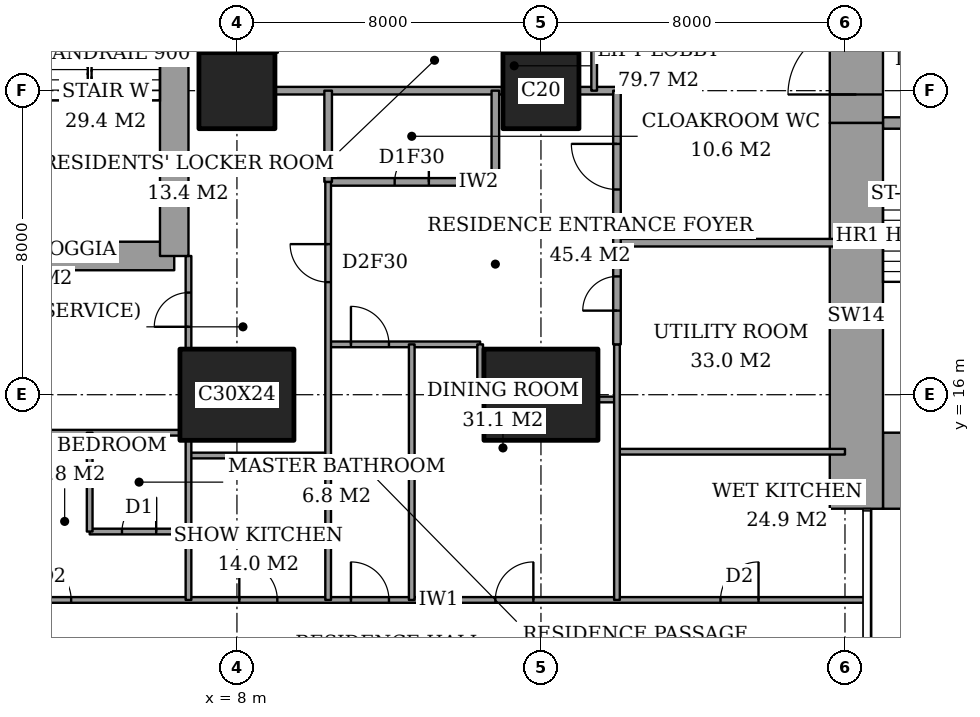
"""IFC4 building model, lengths in metres.
Left out: names, types, materials, properties, quantities, classifications, styles, units other than length and angle.
Written with IfcOpenShell. Run it as: python <this file> out.ifc"""

import sys

from ifc_helpers import new_model, si_unit, direction, frame, frame_2d, origin, origin_2d, place, context, subcontext, project, spatial, rectangle, extrude, element, fill, save


model = new_model("IFC4")
c1 = context("Model", 3, precision=1e-05, world=origin(), true_north=direction((0.0, 1.0)))
c2 = subcontext(c1, "Body", "Model", "MODEL_VIEW")
j1 = project(units=[si_unit("LENGTHUNIT", "METRE"), si_unit("PLANEANGLEUNIT", "RADIAN")], contexts=[c1])
p1 = place(None, origin())
s1 = spatial("IfcSite", under=j1, at=p1, CompositionType="ELEMENT")
p2 = place(p1, origin())
s2 = spatial("IfcBuilding", under=s1, at=p2, CompositionType="ELEMENT")
p3 = place(p2, frame((0.0, 0.0, 29.6)))
s3 = spatial("IfcBuildingStorey", under=s2, at=p3, CompositionType="ELEMENT", Elevation=29.6)
p4 = place(p3, frame((8.0, 16.0, 0.0), z_axis=(0.0, 0.0, 1.0), x_axis=(1.0, 0.0, 0.0)))
e1 = element("IfcColumn", 1, at=p4, inside=s3, PredefinedType="COLUMN", context=c2, shape_type="SweptSolid", body=[
    extrude(rectangle(XDim=3.0, YDim=2.4, at=origin_2d()), origin(), (0.0, 0.0, 1.0), 3.6),
])
p5 = place(p3, frame((8.0, 24.0, 0.0), z_axis=(0.0, 0.0, 1.0), x_axis=(1.0, 0.0, 0.0)))
e2 = element("IfcColumn", 2, at=p5, inside=s3, PredefinedType="COLUMN", context=c2, shape_type="SweptSolid", body=[
    extrude(rectangle(XDim=2.0, YDim=2.0, at=origin_2d()), origin(), (0.0, 0.0, 1.0), 3.6),
])
p6 = place(p3, frame((16.0, 16.0, 0.0), z_axis=(0.0, 0.0, 1.0), x_axis=(1.0, 0.0, 0.0)))
e3 = element("IfcColumn", 3, at=p6, inside=s3, PredefinedType="COLUMN", context=c2, shape_type="SweptSolid", body=[
    extrude(rectangle(XDim=3.0, YDim=2.4, at=origin_2d()), origin(), (0.0, 0.0, 1.0), 3.6),
])
p7 = place(p3, frame((16.0, 24.0, 0.0), z_axis=(0.0, 0.0, 1.0), x_axis=(1.0, 0.0, 0.0)))
e4 = element("IfcColumn", 4, at=p7, inside=s3, PredefinedType="COLUMN", context=c2, shape_type="SweptSolid", body=[
    extrude(rectangle(XDim=2.0, YDim=2.0, at=origin_2d()), origin(), (0.0, 0.0, 1.0), 3.6),
])
p8 = place(p3, frame((25.0, 14.0, 0.0), z_axis=(0.0, 0.0, 1.0), x_axis=(1.0, 0.0, 0.0)))
e5 = element("IfcWall", 5, at=p8, inside=s3, PredefinedType="SHEAR", context=c2, shape_type="SweptSolid", body=[
    extrude(rectangle(XDim=3.15, YDim=2.0, at=frame_2d((1.575, 0.0))), origin(), (0.0, 0.0, 1.0), 3.6),
])
p9 = place(p3, frame((24.3, 13.0, 0.0), z_axis=(0.0, 0.0, 1.0), x_axis=(0.0, 1.0, 0.0)))
e6 = element("IfcWall", 6, at=p9, inside=s3, PredefinedType="SHEAR", context=c2, shape_type="SweptSolid", body=[
    extrude(rectangle(XDim=10.15, YDim=1.4, at=frame_2d((5.075, 0.0))), origin(), (0.0, 0.0, 1.0), 3.6),
])
p10 = place(p3, frame((24.3, 23.15, 0.0), z_axis=(0.0, 0.0, 1.0), x_axis=(0.0, 1.0, 0.0)))
e7 = element("IfcWall", 7, at=p10, inside=s3, PredefinedType="SHEAR", context=c2, shape_type="SweptSolid", body=[
    extrude(rectangle(XDim=11.85, YDim=1.4, at=frame_2d((5.925, 0.0))), origin(), (0.0, 0.0, 1.0), 3.6),
])
p11 = place(p10, frame((0.75, 0.0, 0.0)))
e8 = element("IfcOpeningElement", 8, at=p11, cuts=e7, PredefinedType="OPENING", context=c2, shape_type="SweptSolid", body=[
    extrude(rectangle(XDim=1.8, YDim=2.4, at=frame_2d((0.9, 1.2))), frame((0.0, 0.71, 0.0), z_axis=(0.0, -1.0, 0.0), x_axis=(1.0, 0.0, 0.0)), (0.0, 0.0, 1.0), 1.42),
])
p12 = place(p3, frame((25.0, 23.15, 0.0), z_axis=(0.0, 0.0, 1.0), x_axis=(1.0, 0.0, 0.0)))
e9 = element("IfcWall", 9, at=p12, inside=s3, PredefinedType="SHEAR", context=c2, shape_type="SweptSolid", body=[
    extrude(rectangle(XDim=3.15, YDim=0.3, at=frame_2d((1.575, 0.0))), origin(), (0.0, 0.0, 1.0), 3.6),
])
p13 = place(p12, frame((0.6, 0.0, 0.0)))
e10 = element("IfcOpeningElement", 10, at=p13, cuts=e9, PredefinedType="OPENING", context=c2, shape_type="SweptSolid", body=[
    extrude(rectangle(XDim=1.0, YDim=2.1, at=frame_2d((0.5, 1.05))), frame((0.0, 0.16, 0.0), z_axis=(0.0, -1.0, 0.0), x_axis=(1.0, 0.0, 0.0)), (0.0, 0.0, 1.0), 0.32),
])
p14 = place(p3, frame((1.9, 19.65, 0.0), z_axis=(0.0, 0.0, 1.0), x_axis=(1.0, 0.0, 0.0)))
e11 = element("IfcWall", 11, at=p14, inside=s3, PredefinedType="SHEAR", context=c2, shape_type="SweptSolid", body=[
    extrude(rectangle(XDim=4.45, YDim=0.75, at=frame_2d((2.225, 0.0))), origin(), (0.0, 0.0, 1.0), 3.6),
])
p15 = place(p3, frame((6.35, 19.65, 0.0), z_axis=(0.0, 0.0, 1.0), x_axis=(0.0, 1.0, 0.0)))
e12 = element("IfcWall", 12, at=p15, inside=s3, PredefinedType="SHEAR", context=c2, shape_type="SweptSolid", body=[
    extrude(rectangle(XDim=8.7, YDim=0.75, at=frame_2d((4.35, 0.0))), origin(), (0.0, 0.0, 1.0), 3.6),
])
p16 = place(p15, frame((6.725, 0.0, 0.0)))
e13 = element("IfcOpeningElement", 13, at=p16, cuts=e12, PredefinedType="OPENING", context=c2, shape_type="SweptSolid", body=[
    extrude(rectangle(XDim=1.0, YDim=2.1, at=frame_2d((0.5, 1.05))), frame((0.0, 0.385, 0.0), z_axis=(0.0, -1.0, 0.0), x_axis=(1.0, 0.0, 0.0)), (0.0, 0.0, 1.0), 0.77),
])
p17 = place(p3, frame((-0.45, 10.6, 0.0), z_axis=(0.0, 0.0, 1.0), x_axis=(1.0, 0.0, 0.0)))
e14 = element("IfcWall", 14, at=p17, inside=s3, PredefinedType="PARTITIONING", context=c2, shape_type="SweptSolid", body=[
    extrude(rectangle(XDim=25.011, YDim=0.15, at=frame_2d((12.505, 0.0))), origin(), (0.0, 0.0, 1.0), 3.35),
])
p18 = place(p17, frame((11.45, 0.0, 0.0)))
e15 = element("IfcOpeningElement", 15, at=p18, cuts=e14, PredefinedType="OPENING", context=c2, shape_type="SweptSolid", body=[
    extrude(rectangle(XDim=1.0, YDim=2.1, at=frame_2d((0.5, 1.05))), frame((0.0, 0.085, 0.0), z_axis=(0.0, -1.0, 0.0), x_axis=(1.0, 0.0, 0.0)), (0.0, 0.0, 1.0), 0.17),
])
p19 = place(p17, frame((3.087, 0.0, 0.0)))
e16 = element("IfcOpeningElement", 16, at=p19, cuts=e14, PredefinedType="OPENING", context=c2, shape_type="SweptSolid", body=[
    extrude(rectangle(XDim=1.0, YDim=2.1, at=frame_2d((0.5, 1.05))), frame((0.0, 0.085, 0.0), z_axis=(0.0, -1.0, 0.0), x_axis=(1.0, 0.0, 0.0)), (0.0, 0.0, 1.0), 0.17),
])
p20 = place(p17, frame((8.512, 0.0, 0.0)))
e17 = element("IfcOpeningElement", 17, at=p20, cuts=e14, PredefinedType="OPENING", context=c2, shape_type="SweptSolid", body=[
    extrude(rectangle(XDim=1.0, YDim=2.1, at=frame_2d((0.5, 1.05))), frame((0.0, 0.085, 0.0), z_axis=(0.0, -1.0, 0.0), x_axis=(1.0, 0.0, 0.0)), (0.0, 0.0, 1.0), 0.17),
])
p21 = place(p17, frame((15.25, 0.0, 0.0)))
e18 = element("IfcOpeningElement", 18, at=p21, cuts=e14, PredefinedType="OPENING", context=c2, shape_type="SweptSolid", body=[
    extrude(rectangle(XDim=1.0, YDim=2.1, at=frame_2d((0.5, 1.05))), frame((0.0, 0.085, 0.0), z_axis=(0.0, -1.0, 0.0), x_axis=(1.0, 0.0, 0.0)), (0.0, 0.0, 1.0), 0.17),
])
p22 = place(p17, frame((21.175, 0.0, 0.0)))
e19 = element("IfcOpeningElement", 19, at=p22, cuts=e14, PredefinedType="OPENING", context=c2, shape_type="SweptSolid", body=[
    extrude(rectangle(XDim=1.0, YDim=2.1, at=frame_2d((0.5, 1.05))), frame((0.0, 0.085, 0.0), z_axis=(0.0, -1.0, 0.0), x_axis=(1.0, 0.0, 0.0)), (0.0, 0.0, 1.0), 0.17),
])
p23 = place(p3, frame((4.125, 12.4, 0.0), z_axis=(0.0, 0.0, 1.0), x_axis=(1.0, 0.0, 0.0)))
e20 = element("IfcWall", 20, at=p23, inside=s3, PredefinedType="PARTITIONING", context=c2, shape_type="SweptSolid", body=[
    extrude(rectangle(XDim=2.6, YDim=0.15, at=frame_2d((1.3, 0.0))), origin(), (0.0, 0.0, 1.0), 3.35),
])
p24 = place(p23, frame((0.85, 0.0, 0.0)))
e21 = element("IfcOpeningElement", 21, at=p24, cuts=e20, PredefinedType="OPENING", context=c2, shape_type="SweptSolid", body=[
    extrude(rectangle(XDim=0.9, YDim=2.1, at=frame_2d((0.45, 1.05))), frame((0.0, 0.085, 0.0), z_axis=(0.0, -1.0, 0.0), x_axis=(1.0, 0.0, 0.0)), (0.0, 0.0, 1.0), 0.17),
])
p25 = place(p3, frame((6.725, 14.4, 0.0), z_axis=(0.0, 0.0, 1.0), x_axis=(1.0, 0.0, 0.0)))
e22 = element("IfcWall", 22, at=p25, inside=s3, PredefinedType="PARTITIONING", context=c2, shape_type="SweptSolid", body=[
    extrude(rectangle(XDim=3.675, YDim=0.15, at=frame_2d((1.837, 0.0))), origin(), (0.0, 0.0, 1.0), 3.35),
])
p26 = place(p3, frame((18.0, 14.5, 0.0), z_axis=(0.0, 0.0, 1.0), x_axis=(1.0, 0.0, 0.0)))
e23 = element("IfcWall", 23, at=p26, inside=s3, PredefinedType="PARTITIONING", context=c2, shape_type="SweptSolid", body=[
    extrude(rectangle(XDim=6.0, YDim=0.15, at=frame_2d((3.0, 0.0))), origin(), (0.0, 0.0, 1.0), 3.35),
])
p27 = place(p3, frame((1.35, 15.0, 0.0), z_axis=(0.0, 0.0, 1.0), x_axis=(1.0, 0.0, 0.0)))
e24 = element("IfcWall", 24, at=p27, inside=s3, PredefinedType="PARTITIONING", context=c2, shape_type="SweptSolid", body=[
    extrude(rectangle(XDim=5.15, YDim=0.15, at=frame_2d((2.575, 0.0))), origin(), (0.0, 0.0, 1.0), 3.35),
])
p28 = place(p3, frame((17.5, 15.875, 0.0), z_axis=(0.0, 0.0, 1.0), x_axis=(1.0, 0.0, 0.0)))
e25 = element("IfcWall", 25, at=p28, inside=s3, PredefinedType="PARTITIONING", context=c2, shape_type="SweptSolid", body=[
    extrude(rectangle(XDim=0.5, YDim=0.15, at=frame_2d((0.25, 0.0))), origin(), (0.0, 0.0, 1.0), 2.634),
])
p29 = place(p3, frame((10.4, 17.325, 0.0), z_axis=(0.0, 0.0, 1.0), x_axis=(1.0, 0.0, 0.0)))
e26 = element("IfcWall", 26, at=p29, inside=s3, PredefinedType="PARTITIONING", context=c2, shape_type="SweptSolid", body=[
    extrude(rectangle(XDim=4.0, YDim=0.15, at=frame_2d((2.0, 0.0))), origin(), (0.0, 0.0, 1.0), 3.35),
])
p30 = place(p29, frame((0.6, 0.0, 0.0)))
e27 = element("IfcOpeningElement", 27, at=p30, cuts=e26, PredefinedType="OPENING", context=c2, shape_type="SweptSolid", body=[
    extrude(rectangle(XDim=1.0, YDim=2.1, at=frame_2d((0.5, 1.05))), frame((0.0, 0.085, 0.0), z_axis=(0.0, -1.0, 0.0), x_axis=(1.0, 0.0, 0.0)), (0.0, 0.0, 1.0), 0.17),
])
p31 = place(p3, frame((18.0, 20.0, 0.0), z_axis=(0.0, 0.0, 1.0), x_axis=(1.0, 0.0, 0.0)))
e28 = element("IfcWall", 28, at=p31, inside=s3, PredefinedType="PARTITIONING", context=c2, shape_type="SweptSolid", body=[
    extrude(rectangle(XDim=6.0, YDim=0.2, at=frame_2d((3.0, 0.0))), origin(), (0.0, 0.0, 1.0), 3.35),
])
p32 = place(p3, frame((10.4, 21.6, 0.0), z_axis=(0.0, 0.0, 1.0), x_axis=(1.0, 0.0, 0.0)))
e29 = element("IfcWall", 29, at=p32, inside=s3, PredefinedType="PARTITIONING", context=c2, shape_type="SweptSolid", body=[
    extrude(rectangle(XDim=4.4, YDim=0.2, at=frame_2d((2.2, 0.0))), origin(), (0.0, 0.0, 1.0), 3.35),
])
p33 = place(p32, frame((1.75, 0.0, 0.0)))
e30 = element("IfcOpeningElement", 30, at=p33, cuts=e29, PredefinedType="OPENING", context=c2, shape_type="SweptSolid", body=[
    extrude(rectangle(XDim=0.9, YDim=2.1, at=frame_2d((0.45, 1.05))), frame((0.0, 0.11, 0.0), z_axis=(0.0, -1.0, 0.0), x_axis=(1.0, 0.0, 0.0)), (0.0, 0.0, 1.0), 0.22),
])
p34 = place(p3, frame((9.0, 24.0, 0.0), z_axis=(0.0, 0.0, 1.0), x_axis=(1.0, 0.0, 0.0)))
e31 = element("IfcWall", 31, at=p34, inside=s3, PredefinedType="PARTITIONING", context=c2, shape_type="SweptSolid", body=[
    extrude(rectangle(XDim=6.0, YDim=0.2, at=frame_2d((3.0, 0.0))), origin(), (0.0, 0.0, 1.0), 3.35),
])
p35 = place(p3, frame((17.0, 24.0, 0.0), z_axis=(0.0, 0.0, 1.0), x_axis=(1.0, 0.0, 0.0)))
e32 = element("IfcWall", 32, at=p35, inside=s3, PredefinedType="PARTITIONING", context=c2, shape_type="SweptSolid", body=[
    extrude(rectangle(XDim=1.0, YDim=0.2, at=frame_2d((0.5, 0.0))), origin(), (0.0, 0.0, 1.0), 3.35),
])
p36 = place(p3, frame((4.125, 12.4, 0.0), z_axis=(0.0, 0.0, 1.0), x_axis=(0.0, 1.0, 0.0)))
e33 = element("IfcWall", 33, at=p36, inside=s3, PredefinedType="PARTITIONING", context=c2, shape_type="SweptSolid", body=[
    extrude(rectangle(XDim=2.6, YDim=0.15, at=frame_2d((1.3, 0.0))), origin(), (0.0, 0.0, 1.0), 3.35),
])
p37 = place(p3, frame((6.725, 10.6, 0.0), z_axis=(0.0, 0.0, 1.0), x_axis=(0.0, 1.0, 0.0)))
e34 = element("IfcWall", 34, at=p37, inside=s3, PredefinedType="PARTITIONING", context=c2, shape_type="SweptSolid", body=[
    extrude(rectangle(XDim=4.2, YDim=0.15, at=frame_2d((2.1, 0.0))), origin(), (0.0, 0.0, 1.0), 3.35),
])
p38 = place(p3, frame((6.725, 17.2, 0.0), z_axis=(0.0, 0.0, 1.0), x_axis=(0.0, 1.0, 0.0)))
e35 = element("IfcWall", 35, at=p38, inside=s3, PredefinedType="PARTITIONING", context=c2, shape_type="SweptSolid", body=[
    extrude(rectangle(XDim=2.45, YDim=0.15, at=frame_2d((1.225, 0.0))), origin(), (0.0, 0.0, 1.0), 3.35),
])
p39 = place(p38, frame((0.587, 0.0, 0.0)))
e36 = element("IfcOpeningElement", 36, at=p39, cuts=e35, PredefinedType="OPENING", context=c2, shape_type="SweptSolid", body=[
    extrude(rectangle(XDim=0.9, YDim=2.1, at=frame_2d((0.45, 1.05))), frame((0.0, 0.085, 0.0), z_axis=(0.0, -1.0, 0.0), x_axis=(1.0, 0.0, 0.0)), (0.0, 0.0, 1.0), 0.17),
])
p40 = place(p3, frame((10.4, 21.6, 0.0), z_axis=(0.0, 0.0, 1.0), x_axis=(0.0, 1.0, 0.0)))
e37 = element("IfcWall", 37, at=p40, inside=s3, PredefinedType="PARTITIONING", context=c2, shape_type="SweptSolid", body=[
    extrude(rectangle(XDim=2.4, YDim=0.2, at=frame_2d((1.2, 0.0))), origin(), (0.0, 0.0, 1.0), 3.35),
])
p41 = place(p3, frame((10.4, 10.6, 0.0), z_axis=(0.0, 0.0, 1.0), x_axis=(0.0, 1.0, 0.0)))
e38 = element("IfcWall", 38, at=p41, inside=s3, PredefinedType="PARTITIONING", context=c2, shape_type="SweptSolid", body=[
    extrude(rectangle(XDim=11.0, YDim=0.15, at=frame_2d((5.5, 0.0))), origin(), (0.0, 0.0, 1.0), 3.35),
])
p42 = place(p41, frame((8.363, 0.0, 0.0)))
e39 = element("IfcOpeningElement", 39, at=p42, cuts=e38, PredefinedType="OPENING", context=c2, shape_type="SweptSolid", body=[
    extrude(rectangle(XDim=1.0, YDim=2.1, at=frame_2d((0.5, 1.05))), frame((0.0, 0.085, 0.0), z_axis=(0.0, -1.0, 0.0), x_axis=(1.0, 0.0, 0.0)), (0.0, 0.0, 1.0), 0.17),
])
p43 = place(p3, frame((12.6, 10.6, 0.0), z_axis=(0.0, 0.0, 1.0), x_axis=(0.0, 1.0, 0.0)))
e40 = element("IfcWall", 40, at=p43, inside=s3, PredefinedType="PARTITIONING", context=c2, shape_type="SweptSolid", body=[
    extrude(rectangle(XDim=6.725, YDim=0.15, at=frame_2d((3.362, 0.0))), origin(), (0.0, 0.0, 1.0), 3.35),
])
p44 = place(p3, frame((14.4, 15.875, 0.0), z_axis=(0.0, 0.0, 1.0), x_axis=(0.0, 1.0, 0.0)))
e41 = element("IfcWall", 41, at=p44, inside=s3, PredefinedType="PARTITIONING", context=c2, shape_type="SweptSolid", body=[
    extrude(rectangle(XDim=1.45, YDim=0.15, at=frame_2d((0.725, 0.0))), origin(), (0.0, 0.0, 1.0), 3.35),
])
p45 = place(p3, frame((14.8, 21.6, 0.0), z_axis=(0.0, 0.0, 1.0), x_axis=(0.0, 1.0, 0.0)))
e42 = element("IfcWall", 42, at=p45, inside=s3, PredefinedType="PARTITIONING", context=c2, shape_type="SweptSolid", body=[
    extrude(rectangle(XDim=2.4, YDim=0.2, at=frame_2d((1.2, 0.0))), origin(), (0.0, 0.0, 1.0), 3.35),
])
p46 = place(p3, frame((17.4, 24.0, 0.0), z_axis=(0.0, 0.0, 1.0), x_axis=(0.0, 1.0, 0.0)))
e43 = element("IfcWall", 43, at=p46, inside=s3, PredefinedType="PARTITIONING", context=c2, shape_type="SweptSolid", body=[
    extrude(rectangle(XDim=1.6, YDim=0.15, at=frame_2d((0.8, 0.0))), origin(), (0.0, 0.0, 1.0), 3.35),
])
p47 = place(p3, frame((18.0, 17.325, 0.0), z_axis=(0.0, 0.0, 1.0), x_axis=(0.0, 1.0, 0.0)))
e44 = element("IfcWall", 44, at=p47, inside=s3, PredefinedType="PARTITIONING", context=c2, shape_type="SweptSolid", body=[
    extrude(rectangle(XDim=6.675, YDim=0.2, at=frame_2d((3.337, 0.0))), origin(), (0.0, 0.0, 1.0), 3.35),
])
p48 = place(p47, frame((4.075, 0.0, 0.0)))
e45 = element("IfcOpeningElement", 45, at=p48, cuts=e44, PredefinedType="OPENING", context=c2, shape_type="SweptSolid", body=[
    extrude(rectangle(XDim=1.2, YDim=2.4, at=frame_2d((0.6, 1.2))), frame((0.0, 0.11, 0.0), z_axis=(0.0, -1.0, 0.0), x_axis=(1.0, 0.0, 0.0)), (0.0, 0.0, 1.0), 0.22),
])
p49 = place(p47, frame((0.887, 0.0, 0.0)))
e46 = element("IfcOpeningElement", 46, at=p49, cuts=e44, PredefinedType="OPENING", context=c2, shape_type="SweptSolid", body=[
    extrude(rectangle(XDim=0.9, YDim=2.1, at=frame_2d((0.45, 1.05))), frame((0.0, 0.11, 0.0), z_axis=(0.0, -1.0, 0.0), x_axis=(1.0, 0.0, 0.0)), (0.0, 0.0, 1.0), 0.22),
])
p50 = place(p3, frame((18.0, 10.6, 0.0), z_axis=(0.0, 0.0, 1.0), x_axis=(0.0, 1.0, 0.0)))
e47 = element("IfcWall", 47, at=p50, inside=s3, PredefinedType="PARTITIONING", context=c2, shape_type="SweptSolid", body=[
    extrude(rectangle(XDim=6.725, YDim=0.15, at=frame_2d((3.362, 0.0))), origin(), (0.0, 0.0, 1.0), 3.35),
])
p51 = place(p18, origin())
e48 = element("IfcDoor", 48, at=p51, inside=s3, OperationType="SINGLE_SWING_RIGHT", PredefinedType="DOOR", context=c2, shape_type="SweptSolid", body=[
    extrude(rectangle(XDim=1.0, YDim=2.1, at=frame_2d((0.5, 1.05))), frame((0.0, 0.025, 0.0), z_axis=(0.0, -1.0, 0.0), x_axis=(1.0, 0.0, 0.0)), (0.0, 0.0, 1.0), 0.05),
])
fill(e15, e48)
p52 = place(p24, origin())
e49 = element("IfcDoor", 49, at=p52, inside=s3, OperationType="SINGLE_SWING_LEFT", PredefinedType="DOOR", context=c2, shape_type="SweptSolid", body=[
    extrude(rectangle(XDim=0.9, YDim=2.1, at=frame_2d((0.45, 1.05))), frame((0.0, 0.025, 0.0), z_axis=(0.0, -1.0, 0.0), x_axis=(1.0, 0.0, 0.0)), (0.0, 0.0, 1.0), 0.05),
])
fill(e21, e49)
p53 = place(p19, origin())
e50 = element("IfcDoor", 50, at=p53, inside=s3, OperationType="SINGLE_SWING_RIGHT", PredefinedType="DOOR", context=c2, shape_type="SweptSolid", body=[
    extrude(rectangle(XDim=1.0, YDim=2.1, at=frame_2d((0.5, 1.05))), frame((0.0, 0.025, 0.0), z_axis=(0.0, -1.0, 0.0), x_axis=(1.0, 0.0, 0.0)), (0.0, 0.0, 1.0), 0.05),
])
fill(e16, e50)
p54 = place(p39, origin())
e51 = element("IfcDoor", 51, at=p54, inside=s3, OperationType="SINGLE_SWING_RIGHT", PredefinedType="DOOR", context=c2, shape_type="SweptSolid", body=[
    extrude(rectangle(XDim=0.9, YDim=2.1, at=frame_2d((0.45, 1.05))), frame((0.0, 0.025, 0.0), z_axis=(0.0, -1.0, 0.0), x_axis=(1.0, 0.0, 0.0)), (0.0, 0.0, 1.0), 0.05),
])
fill(e36, e51)
p55 = place(p20, origin())
e52 = element("IfcDoor", 52, at=p55, inside=s3, OperationType="SINGLE_SWING_RIGHT", PredefinedType="DOOR", context=c2, shape_type="SweptSolid", body=[
    extrude(rectangle(XDim=1.0, YDim=2.1, at=frame_2d((0.5, 1.05))), frame((0.0, 0.025, 0.0), z_axis=(0.0, -1.0, 0.0), x_axis=(1.0, 0.0, 0.0)), (0.0, 0.0, 1.0), 0.05),
])
fill(e17, e52)
p56 = place(p42, origin())
e53 = element("IfcDoor", 53, at=p56, inside=s3, OperationType="SINGLE_SWING_LEFT", PredefinedType="DOOR", context=c2, shape_type="SweptSolid", body=[
    extrude(rectangle(XDim=1.0, YDim=2.1, at=frame_2d((0.5, 1.05))), frame((0.0, 0.025, 0.0), z_axis=(0.0, -1.0, 0.0), x_axis=(1.0, 0.0, 0.0)), (0.0, 0.0, 1.0), 0.05),
])
fill(e39, e53)
p57 = place(p33, origin())
e54 = element("IfcDoor", 54, at=p57, inside=s3, OperationType="SINGLE_SWING_LEFT", PredefinedType="DOOR", context=c2, shape_type="SweptSolid", body=[
    extrude(rectangle(XDim=0.9, YDim=2.1, at=frame_2d((0.45, 1.05))), frame((0.0, 0.025, 0.0), z_axis=(0.0, -1.0, 0.0), x_axis=(1.0, 0.0, 0.0)), (0.0, 0.0, 1.0), 0.05),
])
fill(e30, e54)
p58 = place(p48, origin())
e55 = element("IfcDoor", 55, at=p58, inside=s3, OperationType="SINGLE_SWING_LEFT", PredefinedType="DOOR", context=c2, shape_type="SweptSolid", body=[
    extrude(rectangle(XDim=1.2, YDim=2.4, at=frame_2d((0.6, 1.2))), frame((0.0, 0.025, 0.0), z_axis=(0.0, -1.0, 0.0), x_axis=(1.0, 0.0, 0.0)), (0.0, 0.0, 1.0), 0.05),
])
fill(e45, e55)
p59 = place(p30, origin())
e56 = element("IfcDoor", 56, at=p59, inside=s3, OperationType="SINGLE_SWING_RIGHT", PredefinedType="DOOR", context=c2, shape_type="SweptSolid", body=[
    extrude(rectangle(XDim=1.0, YDim=2.1, at=frame_2d((0.5, 1.05))), frame((0.0, 0.025, 0.0), z_axis=(0.0, -1.0, 0.0), x_axis=(1.0, 0.0, 0.0)), (0.0, 0.0, 1.0), 0.05),
])
fill(e27, e56)
p60 = place(p21, origin())
e57 = element("IfcDoor", 57, at=p60, inside=s3, OperationType="SINGLE_SWING_LEFT", PredefinedType="DOOR", context=c2, shape_type="SweptSolid", body=[
    extrude(rectangle(XDim=1.0, YDim=2.1, at=frame_2d((0.5, 1.05))), frame((0.0, 0.025, 0.0), z_axis=(0.0, -1.0, 0.0), x_axis=(1.0, 0.0, 0.0)), (0.0, 0.0, 1.0), 0.05),
])
fill(e18, e57)
p61 = place(p22, origin())
e58 = element("IfcDoor", 58, at=p61, inside=s3, OperationType="SINGLE_SWING_LEFT", PredefinedType="DOOR", context=c2, shape_type="SweptSolid", body=[
    extrude(rectangle(XDim=1.0, YDim=2.1, at=frame_2d((0.5, 1.05))), frame((0.0, 0.025, 0.0), z_axis=(0.0, -1.0, 0.0), x_axis=(1.0, 0.0, 0.0)), (0.0, 0.0, 1.0), 0.05),
])
fill(e19, e58)
p62 = place(p49, origin())
e59 = element("IfcDoor", 59, at=p62, inside=s3, OperationType="SINGLE_SWING_RIGHT", PredefinedType="DOOR", context=c2, shape_type="SweptSolid", body=[
    extrude(rectangle(XDim=0.9, YDim=2.1, at=frame_2d((0.45, 1.05))), frame((0.0, 0.025, 0.0), z_axis=(0.0, -1.0, 0.0), x_axis=(1.0, 0.0, 0.0)), (0.0, 0.0, 1.0), 0.05),
])
fill(e46, e59)
p63 = place(p11, origin())
e60 = element("IfcDoor", 60, at=p63, inside=s3, OperationType="DOUBLE_DOOR_DOUBLE_SWING", PredefinedType="DOOR", context=c2, shape_type="SweptSolid", body=[
    extrude(rectangle(XDim=1.8, YDim=2.4, at=frame_2d((0.9, 1.2))), frame((0.0, 0.025, 0.0), z_axis=(0.0, -1.0, 0.0), x_axis=(1.0, 0.0, 0.0)), (0.0, 0.0, 1.0), 0.05),
])
fill(e8, e60)
save(model, sys.argv[1])
